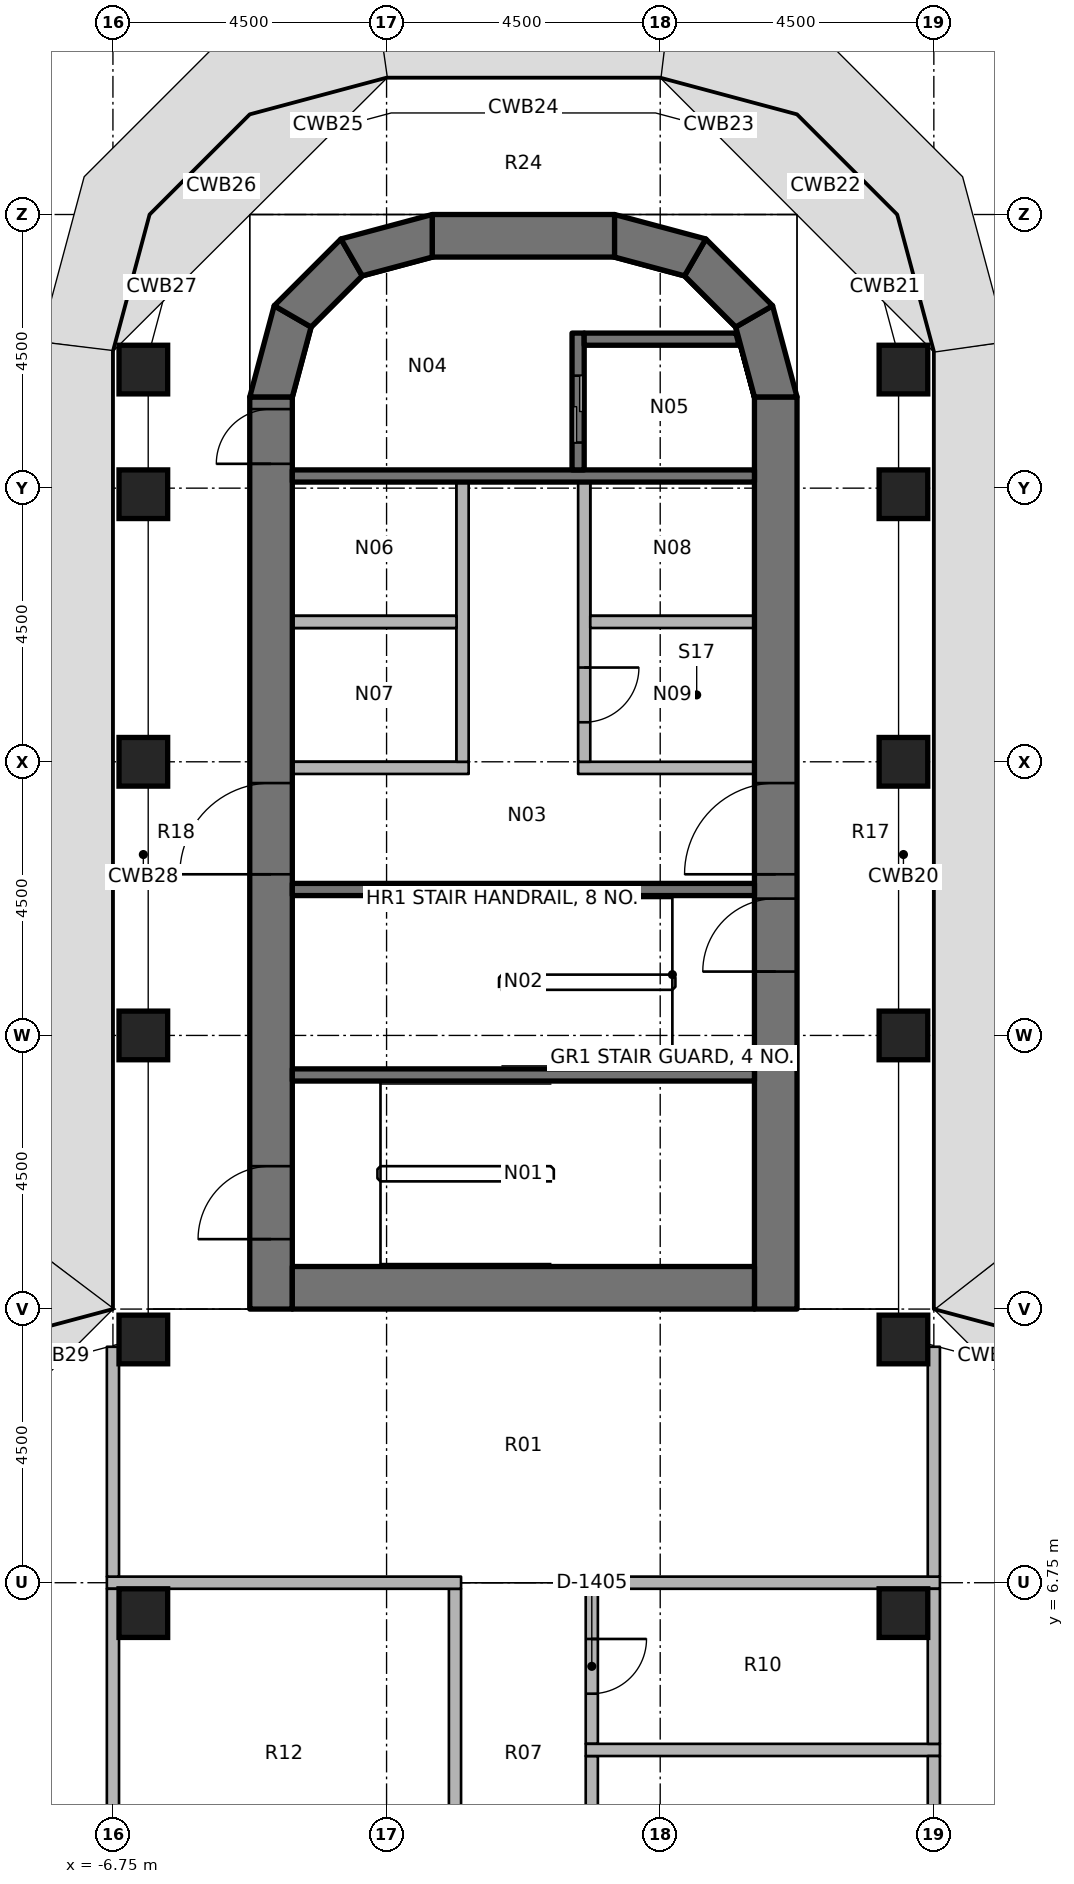
"""IFC4 building model, lengths in metres.
Left out: names, types, materials, properties, quantities, classifications, styles, units other than length and angle.
Written with IfcOpenShell. Run it as: python <this file> out.ifc"""

import sys

from ifc_helpers import new_model, si_unit, direction, frame, frame_2d, origin, origin_2d, place, context, subcontext, project, spatial, polyline, rectangle, outline, extrude, element, fill, save


model = new_model("IFC4")
c1 = context("Model", 3, precision=1e-05, world=origin(), true_north=direction((0.0, 1.0)))
c2 = subcontext(c1, "Body", "Model", "MODEL_VIEW")
j1 = project(units=[si_unit("LENGTHUNIT", "METRE"), si_unit("PLANEANGLEUNIT", "RADIAN")], contexts=[c1])
p1 = place(None, origin())
s1 = spatial("IfcSite", under=j1, at=p1, CompositionType="ELEMENT")
p2 = place(p1, origin())
s2 = spatial("IfcBuilding", under=s1, at=p2, CompositionType="ELEMENT")
p3 = place(p2, frame((0.0, 0.0, 141.0)))
s3 = spatial("IfcBuildingStorey", under=s2, at=p3, CompositionType="ELEMENT", Elevation=141.0)
for number, where, z_axis, x_axis in (
    (1, (-6.25, 6.25, 0.0), (0.0, 0.0, 1.0), (1.0, 0.0, 0.0)),
    (2, (-6.25, 10.75, 0.0), (0.0, 0.0, 1.0), (1.0, 0.0, 0.0)),
    (3, (-6.25, 15.75, 0.0), (0.0, 0.0, 1.0), (1.0, 0.0, 0.0)),
    (4, (-6.25, 20.25, 0.0), (0.0, 0.0, 1.0), (1.0, 0.0, 0.0)),
    (5, (-6.25, 24.65, 0.0), (0.0, 0.0, 1.0), (1.0, 0.0, 0.0)),
    (6, (-6.25, 26.7, 0.0), (0.0, 0.0, 1.0), (1.0, 0.0, 0.0)),
    (7, (6.25, 6.25, 0.0), (0.0, 0.0, 1.0), (1.0, 0.0, 0.0)),
    (8, (6.25, 10.75, 0.0), (0.0, 0.0, 1.0), (1.0, 0.0, 0.0)),
    (9, (6.25, 15.75, 0.0), (0.0, 0.0, 1.0), (1.0, 0.0, 0.0)),
    (10, (6.25, 20.25, 0.0), (0.0, 0.0, 1.0), (1.0, 0.0, 0.0)),
    (11, (6.25, 24.65, 0.0), (0.0, 0.0, 1.0), (1.0, 0.0, 0.0)),
    (12, (6.25, 26.7, 0.0), (0.0, 0.0, 1.0), (1.0, 0.0, 0.0)),
):
    element("IfcColumn", number, at=place(p3, frame(where, z_axis=z_axis, x_axis=x_axis)), inside=s3, PredefinedType="COLUMN", context=c2, shape_type="SweptSolid", body=[
        extrude(rectangle(XDim=0.8, YDim=0.8, at=origin_2d()), origin(), (0.0, 0.0, 1.0), 3.65),
    ])
p4 = place(p3, frame((-4.15, 11.25, 0.0), z_axis=(0.0, 0.0, 1.0), x_axis=(0.0, 1.0, 0.0)))
e13 = element("IfcWall", 13, at=p4, inside=s3, PredefinedType="SHEAR", context=c2, shape_type="SweptSolid", body=[
    extrude(rectangle(XDim=15.0, YDim=0.7, at=frame_2d((7.5, 0.0))), origin(), (0.0, 0.0, 1.0), 3.8),
])
p5 = place(p4, frame((7.15, 0.0, 0.0)))
e14 = element("IfcOpeningElement", 14, at=p5, cuts=e13, PredefinedType="OPENING", context=c2, shape_type="SweptSolid", body=[
    extrude(rectangle(XDim=1.5, YDim=2.3, at=frame_2d((0.75, 1.15))), frame((0.0, 0.36, 0.0), z_axis=(0.0, -1.0, 0.0), x_axis=(1.0, 0.0, 0.0)), (0.0, 0.0, 1.0), 0.72),
])
p6 = place(p4, frame((13.9, 0.0, 0.0)))
e15 = element("IfcOpeningElement", 15, at=p6, cuts=e13, PredefinedType="OPENING", context=c2, shape_type="SweptSolid", body=[
    extrude(rectangle(XDim=0.9, YDim=2.1, at=frame_2d((0.45, 1.05))), frame((0.0, 0.36, 0.0), z_axis=(0.0, -1.0, 0.0), x_axis=(1.0, 0.0, 0.0)), (0.0, 0.0, 1.0), 0.72),
])
p7 = place(p4, frame((1.15, 0.0, 0.0)))
e16 = element("IfcOpeningElement", 16, at=p7, cuts=e13, PredefinedType="OPENING", context=c2, shape_type="SweptSolid", body=[
    extrude(rectangle(XDim=1.2, YDim=2.1, at=frame_2d((0.6, 1.05))), frame((0.0, 0.36, 0.0), z_axis=(0.0, -1.0, 0.0), x_axis=(1.0, 0.0, 0.0)), (0.0, 0.0, 1.0), 0.72),
])
p8 = place(p3, frame((4.15, 11.25, 0.0), z_axis=(0.0, 0.0, 1.0), x_axis=(0.0, 1.0, 0.0)))
e17 = element("IfcWall", 17, at=p8, inside=s3, PredefinedType="SHEAR", context=c2, shape_type="SweptSolid", body=[
    extrude(rectangle(XDim=15.0, YDim=0.7, at=frame_2d((7.5, 0.0))), origin(), (0.0, 0.0, 1.0), 3.8),
])
p9 = place(p8, frame((7.15, 0.0, 0.0)))
e18 = element("IfcOpeningElement", 18, at=p9, cuts=e17, PredefinedType="OPENING", context=c2, shape_type="SweptSolid", body=[
    extrude(rectangle(XDim=1.5, YDim=2.3, at=frame_2d((0.75, 1.15))), frame((0.0, 0.36, 0.0), z_axis=(0.0, -1.0, 0.0), x_axis=(1.0, 0.0, 0.0)), (0.0, 0.0, 1.0), 0.72),
])
p10 = place(p8, frame((5.55, 0.0, 0.0)))
e19 = element("IfcOpeningElement", 19, at=p10, cuts=e17, PredefinedType="OPENING", context=c2, shape_type="SweptSolid", body=[
    extrude(rectangle(XDim=1.2, YDim=2.1, at=frame_2d((0.6, 1.05))), frame((0.0, 0.36, 0.0), z_axis=(0.0, -1.0, 0.0), x_axis=(1.0, 0.0, 0.0)), (0.0, 0.0, 1.0), 0.72),
])
p11 = place(p3, frame((-3.8, 11.6, 0.0), z_axis=(0.0, 0.0, 1.0), x_axis=(1.0, 0.0, 0.0)))
e20 = element("IfcWall", 20, at=p11, inside=s3, PredefinedType="SHEAR", context=c2, shape_type="SweptSolid", body=[
    extrude(rectangle(XDim=7.6, YDim=0.7, at=frame_2d((3.8, 0.0))), origin(), (0.0, 0.0, 1.0), 3.8),
])
p12 = place(p3, frame((-1.5, 28.9, 0.0), z_axis=(0.0, 0.0, 1.0), x_axis=(1.0, 0.0, 0.0)))
e21 = element("IfcWall", 21, at=p12, inside=s3, PredefinedType="SHEAR", context=c2, shape_type="SweptSolid", body=[
    extrude(rectangle(XDim=3.0, YDim=0.7, at=frame_2d((1.5, 0.0))), origin(), (0.0, 0.0, 1.0), 3.8),
])
p13 = place(p3, origin())
e22 = element("IfcWall", 22, at=p13, inside=s3, PredefinedType="SHEAR", context=c2, shape_type="SweptSolid", body=[
    extrude(outline(polyline([(-4.5, 26.25), (-4.098, 27.75), (-3.492, 27.4), (-3.8, 26.25), (-4.5, 26.25)])), origin(), (0.0, 0.0, 1.0), 3.8),
])
p14 = place(p3, origin())
e23 = element("IfcWall", 23, at=p14, inside=s3, PredefinedType="SHEAR", context=c2, shape_type="SweptSolid", body=[
    extrude(outline(polyline([(-4.098, 27.75), (-3.0, 28.848), (-2.65, 28.242), (-3.492, 27.4), (-4.098, 27.75)])), origin(), (0.0, 0.0, 1.0), 3.8),
])
p15 = place(p3, origin())
e24 = element("IfcWall", 24, at=p15, inside=s3, PredefinedType="SHEAR", context=c2, shape_type="SweptSolid", body=[
    extrude(outline(polyline([(-3.0, 28.848), (-1.5, 29.25), (-1.5, 28.55), (-2.65, 28.242), (-3.0, 28.848)])), origin(), (0.0, 0.0, 1.0), 3.8),
])
p16 = place(p3, origin())
e25 = element("IfcWall", 25, at=p16, inside=s3, PredefinedType="SHEAR", context=c2, shape_type="SweptSolid", body=[
    extrude(outline(polyline([(4.5, 26.25), (4.098, 27.75), (3.492, 27.4), (3.8, 26.25), (4.5, 26.25)])), origin(), (0.0, 0.0, 1.0), 3.8),
])
p17 = place(p3, origin())
e26 = element("IfcWall", 26, at=p17, inside=s3, PredefinedType="SHEAR", context=c2, shape_type="SweptSolid", body=[
    extrude(outline(polyline([(4.098, 27.75), (3.0, 28.848), (2.65, 28.242), (3.492, 27.4), (4.098, 27.75)])), origin(), (0.0, 0.0, 1.0), 3.8),
])
p18 = place(p3, origin())
e27 = element("IfcWall", 27, at=p18, inside=s3, PredefinedType="SHEAR", context=c2, shape_type="SweptSolid", body=[
    extrude(outline(polyline([(3.0, 28.848), (1.5, 29.25), (1.5, 28.55), (2.65, 28.242), (3.0, 28.848)])), origin(), (0.0, 0.0, 1.0), 3.8),
])
p19 = place(p3, frame((-3.8, 24.95, 0.0), z_axis=(0.0, 0.0, 1.0), x_axis=(1.0, 0.0, 0.0)))
e28 = element("IfcWall", 28, at=p19, inside=s3, PredefinedType="SHEAR", context=c2, shape_type="SweptSolid", body=[
    extrude(rectangle(XDim=7.6, YDim=0.2, at=frame_2d((3.8, 0.0))), origin(), (0.0, 0.0, 1.0), 3.65),
])
p20 = place(p3, frame((0.9, 27.3, 0.0), z_axis=(0.0, 0.0, 1.0), x_axis=(0.0, -1.0, 0.0)))
e29 = element("IfcWall", 29, at=p20, inside=s3, PredefinedType="SHEAR", context=c2, shape_type="SweptSolid", body=[
    extrude(rectangle(XDim=2.25, YDim=0.2, at=frame_2d((1.125, 0.0))), origin(), (0.0, 0.0, 1.0), 3.65),
])
p21 = place(p20, frame((0.7, 0.0, 0.0)))
e30 = element("IfcOpeningElement", 30, at=p21, cuts=e29, PredefinedType="OPENING", context=c2, shape_type="SweptSolid", body=[
    extrude(rectangle(XDim=1.1, YDim=2.3, at=frame_2d((0.55, 1.15))), frame((0.0, 0.11, 0.0), z_axis=(0.0, -1.0, 0.0), x_axis=(1.0, 0.0, 0.0)), (0.0, 0.0, 1.0), 0.22),
])
p22 = place(p3, origin())
e31 = element("IfcWall", 31, at=p22, inside=s3, PredefinedType="SHEAR", context=c2, shape_type="SweptSolid", body=[
    extrude(outline(polyline([(1.0, 27.1), (3.548, 27.1), (3.494, 27.3), (1.0, 27.3), (1.0, 27.1)])), origin(), (0.0, 0.0, 1.0), 3.65),
])
for number, where, z_axis, x_axis in (
    (32, (-3.8, 18.15, 0.0), (0.0, 0.0, 1.0), (1.0, 0.0, 0.0)),
    (33, (-3.8, 15.1, 0.0), (0.0, 0.0, 1.0), (1.0, 0.0, 0.0)),
):
    element("IfcWall", number, at=place(p3, frame(where, z_axis=z_axis, x_axis=x_axis)), inside=s3, PredefinedType="SHEAR", context=c2, shape_type="SweptSolid", body=[
        extrude(rectangle(XDim=7.6, YDim=0.2, at=frame_2d((3.8, 0.0))), origin(), (0.0, 0.0, 1.0), 3.65),
    ])
p23 = place(p3, frame((-3.8, 20.15, 0.0), z_axis=(0.0, 0.0, 1.0), x_axis=(1.0, 0.0, 0.0)))
e34 = element("IfcWall", 34, at=p23, inside=s3, PredefinedType="PARTITIONING", context=c2, shape_type="SweptSolid", body=[
    extrude(rectangle(XDim=2.9, YDim=0.2, at=frame_2d((1.45, 0.0))), origin(), (0.0, 0.0, 1.0), 3.65),
])
p24 = place(p3, frame((-1.0, 24.85, 0.0), z_axis=(0.0, 0.0, 1.0), x_axis=(0.0, -1.0, 0.0)))
e35 = element("IfcWall", 35, at=p24, inside=s3, PredefinedType="PARTITIONING", context=c2, shape_type="SweptSolid", body=[
    extrude(rectangle(XDim=4.6, YDim=0.2, at=frame_2d((2.3, 0.0))), origin(), (0.0, 0.0, 1.0), 3.65),
])
p25 = place(p3, frame((0.9, 20.15, 0.0), z_axis=(0.0, 0.0, 1.0), x_axis=(1.0, 0.0, 0.0)))
e36 = element("IfcWall", 36, at=p25, inside=s3, PredefinedType="PARTITIONING", context=c2, shape_type="SweptSolid", body=[
    extrude(rectangle(XDim=2.9, YDim=0.2, at=frame_2d((1.45, 0.0))), origin(), (0.0, 0.0, 1.0), 3.65),
])
p26 = place(p3, frame((1.0, 24.85, 0.0), z_axis=(0.0, 0.0, 1.0), x_axis=(0.0, -1.0, 0.0)))
e37 = element("IfcWall", 37, at=p26, inside=s3, PredefinedType="PARTITIONING", context=c2, shape_type="SweptSolid", body=[
    extrude(rectangle(XDim=4.6, YDim=0.2, at=frame_2d((2.3, 0.0))), origin(), (0.0, 0.0, 1.0), 3.65),
])
p27 = place(p26, frame((3.05, 0.0, 0.0)))
e38 = element("IfcOpeningElement", 38, at=p27, cuts=e37, PredefinedType="OPENING", context=c2, shape_type="SweptSolid", body=[
    extrude(rectangle(XDim=0.9, YDim=2.1, at=frame_2d((0.45, 1.05))), frame((0.0, 0.11, 0.0), z_axis=(0.0, -1.0, 0.0), x_axis=(1.0, 0.0, 0.0)), (0.0, 0.0, 1.0), 0.22),
])
for number, where, z_axis, x_axis in (
    (39, (-3.8, 22.55, 0.0), (0.0, 0.0, 1.0), (1.0, 0.0, 0.0)),
    (40, (1.1, 22.55, 0.0), (0.0, 0.0, 1.0), (1.0, 0.0, 0.0)),
):
    element("IfcWall", number, at=place(p3, frame(where, z_axis=z_axis, x_axis=x_axis)), inside=s3, PredefinedType="PARTITIONING", context=c2, shape_type="SweptSolid", body=[
        extrude(rectangle(XDim=2.7, YDim=0.2, at=frame_2d((1.35, 0.0))), origin(), (0.0, 0.0, 1.0), 3.65),
    ])
p28 = place(p3, frame((1.125, 1.225, 0.0), z_axis=(0.0, 0.0, 1.0), x_axis=(0.0, 1.0, 0.0)))
e41 = element("IfcWall", 41, at=p28, inside=s3, PredefinedType="PARTITIONING", context=c2, shape_type="SweptSolid", body=[
    extrude(rectangle(XDim=2.675, YDim=0.2, at=frame_2d((1.337, 0.0))), origin(), (0.0, 0.0, 1.0), 2.75),
])
p29 = place(p3, frame((1.125, 6.65, 0.0), z_axis=(0.0, 0.0, 1.0), x_axis=(0.0, -1.0, 0.0)))
e42 = element("IfcWall", 42, at=p29, inside=s3, PredefinedType="PARTITIONING", context=c2, shape_type="SweptSolid", body=[
    extrude(rectangle(XDim=2.55, YDim=0.2, at=frame_2d((1.275, 0.0))), origin(), (0.0, 0.0, 1.0), 2.75),
])
p30 = place(p29, frame((0.825, 0.0, 0.0)))
e43 = element("IfcOpeningElement", 43, at=p30, cuts=e42, PredefinedType="OPENING", context=c2, shape_type="SweptSolid", body=[
    extrude(rectangle(XDim=0.9, YDim=2.1, at=frame_2d((0.45, 1.05))), frame((0.0, 0.11, 0.0), z_axis=(0.0, -1.0, 0.0), x_axis=(1.0, 0.0, 0.0)), (0.0, 0.0, 1.0), 0.22),
])
p31 = place(p3, frame((-1.125, 1.225, 0.0), z_axis=(0.0, 0.0, 1.0), x_axis=(0.0, 1.0, 0.0)))
e44 = element("IfcWall", 44, at=p31, inside=s3, PredefinedType="PARTITIONING", context=c2, shape_type="SweptSolid", body=[
    extrude(rectangle(XDim=5.425, YDim=0.2, at=frame_2d((2.712, 0.0))), origin(), (0.0, 0.0, 1.0), 2.75),
])
p32 = place(p3, frame((1.025, 6.75, 0.0), z_axis=(0.0, 0.0, 1.0), x_axis=(1.0, 0.0, 0.0)))
e45 = element("IfcWall", 45, at=p32, inside=s3, PredefinedType="PARTITIONING", context=c2, shape_type="SweptSolid", body=[
    extrude(rectangle(XDim=5.825, YDim=0.2, at=frame_2d((2.913, 0.0))), origin(), (0.0, 0.0, 1.0), 2.75),
])
p33 = place(p3, frame((6.75, 6.85, 0.0), z_axis=(0.0, 0.0, 1.0), x_axis=(0.0, 1.0, 0.0)))
e46 = element("IfcWall", 46, at=p33, inside=s3, PredefinedType="PARTITIONING", context=c2, shape_type="SweptSolid", body=[
    extrude(rectangle(XDim=3.78, YDim=0.2, at=frame_2d((1.89, 0.0))), origin(), (0.0, 0.0, 1.0), 2.75),
])
p34 = place(p3, frame((-6.85, 6.75, 0.0), z_axis=(0.0, 0.0, 1.0), x_axis=(1.0, 0.0, 0.0)))
e47 = element("IfcWall", 47, at=p34, inside=s3, PredefinedType="PARTITIONING", context=c2, shape_type="SweptSolid", body=[
    extrude(rectangle(XDim=5.825, YDim=0.2, at=frame_2d((2.913, 0.0))), origin(), (0.0, 0.0, 1.0), 2.75),
])
p35 = place(p3, frame((-6.75, 6.85, 0.0), z_axis=(0.0, 0.0, 1.0), x_axis=(0.0, 1.0, 0.0)))
e48 = element("IfcWall", 48, at=p35, inside=s3, PredefinedType="PARTITIONING", context=c2, shape_type="SweptSolid", body=[
    extrude(rectangle(XDim=3.78, YDim=0.2, at=frame_2d((1.89, 0.0))), origin(), (0.0, 0.0, 1.0), 2.75),
])
p36 = place(p3, frame((1.025, 4.0, 0.0), z_axis=(0.0, 0.0, 1.0), x_axis=(1.0, 0.0, 0.0)))
e49 = element("IfcWall", 49, at=p36, inside=s3, PredefinedType="PARTITIONING", context=c2, shape_type="SweptSolid", body=[
    extrude(rectangle(XDim=5.825, YDim=0.2, at=frame_2d((2.913, 0.0))), origin(), (0.0, 0.0, 1.0), 2.75),
])
p37 = place(p3, frame((6.75, 1.225, 0.0), z_axis=(0.0, 0.0, 1.0), x_axis=(0.0, 1.0, 0.0)))
e50 = element("IfcWall", 50, at=p37, inside=s3, PredefinedType="PARTITIONING", context=c2, shape_type="SweptSolid", body=[
    extrude(rectangle(XDim=2.675, YDim=0.2, at=frame_2d((1.337, 0.0))), origin(), (0.0, 0.0, 1.0), 2.75),
])
p38 = place(p3, frame((6.75, 4.1, 0.0), z_axis=(0.0, 0.0, 1.0), x_axis=(0.0, 1.0, 0.0)))
e51 = element("IfcWall", 51, at=p38, inside=s3, PredefinedType="PARTITIONING", context=c2, shape_type="SweptSolid", body=[
    extrude(rectangle(XDim=2.55, YDim=0.2, at=frame_2d((1.275, 0.0))), origin(), (0.0, 0.0, 1.0), 2.75),
])
p39 = place(p3, frame((-6.75, 1.225, 0.0), z_axis=(0.0, 0.0, 1.0), x_axis=(0.0, 1.0, 0.0)))
e52 = element("IfcWall", 52, at=p39, inside=s3, PredefinedType="PARTITIONING", context=c2, shape_type="SweptSolid", body=[
    extrude(rectangle(XDim=5.425, YDim=0.2, at=frame_2d((2.712, 0.0))), origin(), (0.0, 0.0, 1.0), 2.75),
])
p40 = place(p5, origin())
e53 = element("IfcDoor", 53, at=p40, inside=s3, OperationType="DOUBLE_DOOR_SINGLE_SWING", PredefinedType="DOOR", context=c2, shape_type="SweptSolid", body=[
    extrude(rectangle(XDim=1.5, YDim=2.3, at=frame_2d((0.75, 1.15))), frame((0.0, 0.025, 0.0), z_axis=(0.0, -1.0, 0.0), x_axis=(1.0, 0.0, 0.0)), (0.0, 0.0, 1.0), 0.05),
])
fill(e14, e53)
p41 = place(p9, origin())
e54 = element("IfcDoor", 54, at=p41, inside=s3, OperationType="DOUBLE_DOOR_SINGLE_SWING", PredefinedType="DOOR", context=c2, shape_type="SweptSolid", body=[
    extrude(rectangle(XDim=1.5, YDim=2.3, at=frame_2d((0.75, 1.15))), frame((0.0, 0.025, 0.0), z_axis=(0.0, -1.0, 0.0), x_axis=(1.0, 0.0, 0.0)), (0.0, 0.0, 1.0), 0.05),
])
fill(e18, e54)
p42 = place(p6, origin())
e55 = element("IfcDoor", 55, at=p42, inside=s3, OperationType="SINGLE_SWING_RIGHT", PredefinedType="DOOR", context=c2, shape_type="SweptSolid", body=[
    extrude(rectangle(XDim=0.9, YDim=2.1, at=frame_2d((0.45, 1.05))), frame((0.0, 0.025, 0.0), z_axis=(0.0, -1.0, 0.0), x_axis=(1.0, 0.0, 0.0)), (0.0, 0.0, 1.0), 0.05),
])
fill(e15, e55)
p43 = place(p10, origin())
e56 = element("IfcDoor", 56, at=p43, inside=s3, OperationType="SINGLE_SWING_LEFT", PredefinedType="DOOR", context=c2, shape_type="SweptSolid", body=[
    extrude(rectangle(XDim=1.2, YDim=2.1, at=frame_2d((0.6, 1.05))), frame((0.0, 0.025, 0.0), z_axis=(0.0, -1.0, 0.0), x_axis=(1.0, 0.0, 0.0)), (0.0, 0.0, 1.0), 0.05),
])
fill(e19, e56)
p44 = place(p7, origin())
e57 = element("IfcDoor", 57, at=p44, inside=s3, OperationType="SINGLE_SWING_RIGHT", PredefinedType="DOOR", context=c2, shape_type="SweptSolid", body=[
    extrude(rectangle(XDim=1.2, YDim=2.1, at=frame_2d((0.6, 1.05))), frame((0.0, 0.025, 0.0), z_axis=(0.0, -1.0, 0.0), x_axis=(1.0, 0.0, 0.0)), (0.0, 0.0, 1.0), 0.05),
])
fill(e16, e57)
p45 = place(p21, origin())
e58 = element("IfcDoor", 58, at=p45, inside=s3, OperationType="DOUBLE_DOOR_SLIDING", PredefinedType="DOOR", context=c2, shape_type="SweptSolid", body=[
    extrude(rectangle(XDim=1.1, YDim=2.3, at=frame_2d((0.55, 1.15))), frame((0.0, 0.025, 0.0), z_axis=(0.0, -1.0, 0.0), x_axis=(1.0, 0.0, 0.0)), (0.0, 0.0, 1.0), 0.05),
])
fill(e30, e58)
p46 = place(p27, origin())
e59 = element("IfcDoor", 59, at=p46, inside=s3, OperationType="SINGLE_SWING_LEFT", PredefinedType="DOOR", context=c2, shape_type="SweptSolid", body=[
    extrude(rectangle(XDim=0.9, YDim=2.1, at=frame_2d((0.45, 1.05))), frame((0.0, 0.025, 0.0), z_axis=(0.0, -1.0, 0.0), x_axis=(1.0, 0.0, 0.0)), (0.0, 0.0, 1.0), 0.05),
])
fill(e38, e59)
p47 = place(p30, origin())
e60 = element("IfcDoor", 60, at=p47, inside=s3, OperationType="SINGLE_SWING_RIGHT", PredefinedType="DOOR", context=c2, shape_type="SweptSolid", body=[
    extrude(rectangle(XDim=0.9, YDim=2.1, at=frame_2d((0.45, 1.05))), frame((0.0, 0.025, 0.0), z_axis=(0.0, -1.0, 0.0), x_axis=(1.0, 0.0, 0.0)), (0.0, 0.0, 1.0), 0.05),
])
fill(e43, e60)
save(model, sys.argv[1])
